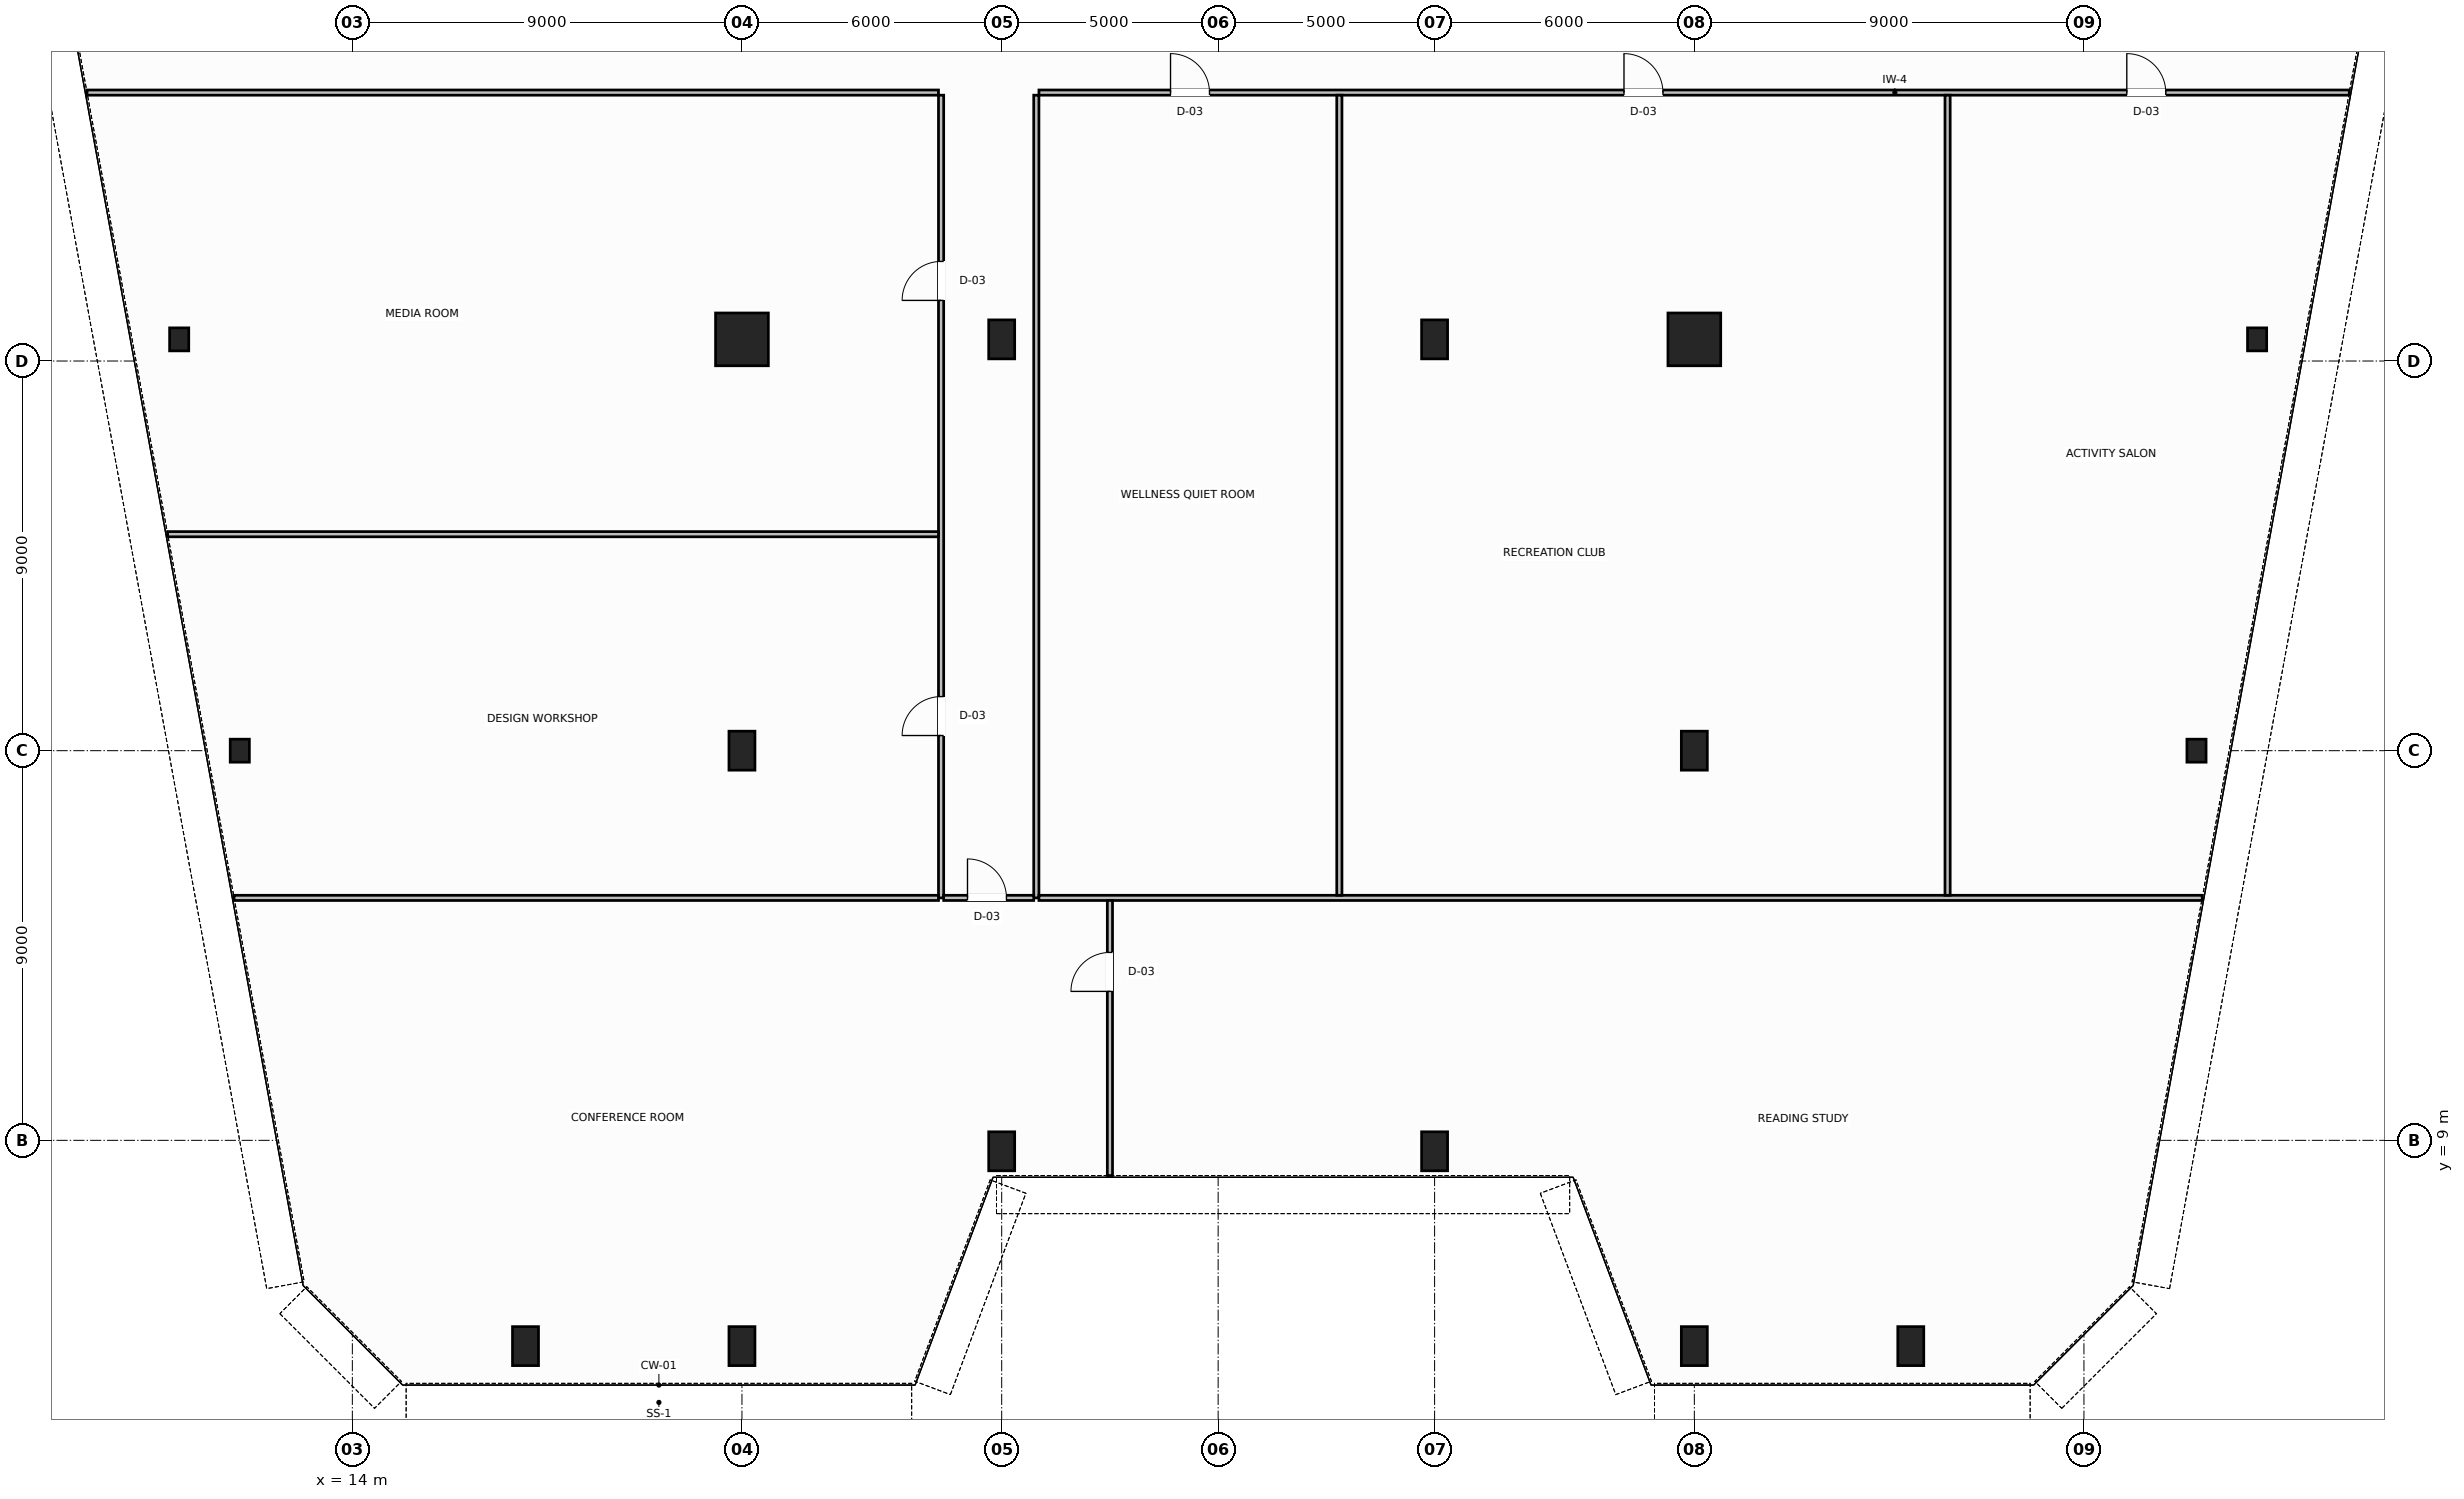
"""IFC4 building model, lengths in metres.
Left out: names, types, materials, properties, quantities, classifications, styles, units other than length and angle.
Written with IfcOpenShell. Run it as: python <this file> out.ifc"""

import sys

from ifc_helpers import new_model, si_unit, direction, frame, frame_2d, origin, origin_2d, place, context, subcontext, project, spatial, rectangle, hollow_rectangle, hollow_circle, i_section, extrude, source, transform, mapped, element, fill, save


model = new_model("IFC4")
c1 = context("Model", 3, precision=1e-05, world=origin(), true_north=direction((0.0, 1.0)))
c2 = subcontext(c1, "Body", "Model", "MODEL_VIEW")
j1 = project(units=[si_unit("LENGTHUNIT", "METRE"), si_unit("PLANEANGLEUNIT", "RADIAN")], contexts=[c1])
p1 = place(None, origin())
s1 = spatial("IfcSite", under=j1, at=p1, CompositionType="ELEMENT")
p2 = place(p1, origin())
s2 = spatial("IfcBuilding", under=s1, at=p2, CompositionType="ELEMENT")
p3 = place(p2, frame((0.0, 0.0, 72.0)))
s3 = spatial("IfcBuildingStorey", under=s2, at=p3, CompositionType="ELEMENT", Elevation=72.0)
m1 = source(origin(), c2, "Body", "SweptSolid", [
    extrude(i_section(OverallWidth=0.442, OverallDepth=0.531, WebThickness=0.065, FlangeThickness=0.076, FilletRadius=0.015, at=origin_2d()), origin(), (0.0, 0.0, 1.0), 3.8),
])
for number, where, z_axis, x_axis in (
    (1, (10.0, 27.5, 0.0), (0.0, 0.0, 1.0), (1.0, 0.0, 0.0)),
    (2, (11.4, 18.0, 0.0), (0.0, 0.0, 1.0), (1.0, 0.0, 0.0)),
    (3, (58.0, 27.5, 0.0), (0.0, 0.0, 1.0), (1.0, 0.0, 0.0)),
    (4, (56.6, 18.0, 0.0), (0.0, 0.0, 1.0), (1.0, 0.0, 0.0)),
):
    element("IfcColumn", number, at=place(p3, frame(where, z_axis=z_axis, x_axis=x_axis)), inside=s3, PredefinedType="COLUMN", context=c2, shape_type="MappedRepresentation", body=[
        mapped(m1, transform((0.0, 0.0, 0.0), scale=1.0)),
    ])
m2 = source(origin(), c2, "Body", "SweptSolid", [
    extrude(hollow_circle(Radius=0.61, WallThickness=0.05, at=origin_2d()), origin(), (0.0, 0.0, 1.0), 3.8),
])
p4 = place(p3, frame((23.0, 27.5, 0.0), z_axis=(0.0, 0.0, 1.0), x_axis=(1.0, 0.0, 0.0)))
e5 = element("IfcColumn", 5, at=p4, inside=s3, PredefinedType="COLUMN", context=c2, shape_type="MappedRepresentation", body=[
    mapped(m2, transform((0.0, 0.0, 0.0), scale=1.0)),
])
m3 = source(origin(), c2, "Body", "SweptSolid", [
    extrude(hollow_rectangle(XDim=0.6, YDim=0.9, WallThickness=0.04, InnerFilletRadius=0.04, OuterFilletRadius=0.08, at=origin_2d()), origin(), (0.0, 0.0, 1.0), 3.8),
])
for number, where, z_axis, x_axis in (
    (6, (29.0, 27.5, 0.0), (0.0, 0.0, 1.0), (1.0, 0.0, 0.0)),
    (7, (39.0, 27.5, 0.0), (0.0, 0.0, 1.0), (1.0, 0.0, 0.0)),
):
    element("IfcColumn", number, at=place(p3, frame(where, z_axis=z_axis, x_axis=x_axis)), inside=s3, PredefinedType="COLUMN", context=c2, shape_type="MappedRepresentation", body=[
        mapped(m3, transform((0.0, 0.0, 0.0), scale=1.0)),
    ])
p5 = place(p3, frame((45.0, 27.5, 0.0), z_axis=(0.0, 0.0, 1.0), x_axis=(1.0, 0.0, 0.0)))
e8 = element("IfcColumn", 8, at=p5, inside=s3, PredefinedType="COLUMN", context=c2, shape_type="MappedRepresentation", body=[
    mapped(m2, transform((0.0, 0.0, 0.0), scale=1.0)),
])
for number, where, z_axis, x_axis in (
    (9, (23.0, 18.0, 0.0), (0.0, 0.0, 1.0), (1.0, 0.0, 0.0)),
    (10, (45.0, 18.0, 0.0), (0.0, 0.0, 1.0), (1.0, 0.0, 0.0)),
):
    element("IfcColumn", number, at=place(p3, frame(where, z_axis=z_axis, x_axis=x_axis)), inside=s3, PredefinedType="COLUMN", context=c2, shape_type="MappedRepresentation", body=[
        mapped(m3, transform((0.0, 0.0, 0.0), scale=1.0)),
    ])
m4 = source(origin(), c2, "Body", "SweptSolid", [
    extrude(hollow_rectangle(XDim=0.6, YDim=0.9, WallThickness=0.04, InnerFilletRadius=0.04, OuterFilletRadius=0.08, at=origin_2d()), origin(), (0.0, 0.0, 1.0), 3.744),
])
for number, where, z_axis, x_axis in (
    (11, (18.0, 4.247, 0.032), (0.0, 0.064, 0.998), (-1.0, 0.0, 0.0)),
    (12, (23.0, 4.247, 0.032), (0.0, 0.064, 0.998), (-1.0, 0.0, 0.0)),
    (13, (29.0, 8.747, 0.032), (0.0, 0.064, 0.998), (-1.0, 0.0, 0.0)),
    (14, (39.0, 8.747, 0.032), (0.0, 0.064, 0.998), (-1.0, 0.0, 0.0)),
    (15, (45.0, 4.247, 0.032), (0.0, 0.064, 0.998), (-1.0, 0.0, 0.0)),
    (16, (50.0, 4.247, 0.032), (0.0, 0.064, 0.998), (-1.0, 0.0, 0.0)),
):
    element("IfcColumn", number, at=place(p3, frame(where, z_axis=z_axis, x_axis=x_axis)), inside=s3, PredefinedType="COLUMN", context=c2, shape_type="MappedRepresentation", body=[
        mapped(m4, transform((0.0, 0.0, 0.0), scale=1.0)),
    ])
p6 = place(p3, frame((7.871, 33.2, 0.0), z_axis=(0.0, 0.0, 1.0), x_axis=(1.0, 0.0, 0.0)))
e17 = element("IfcWall", 17, at=p6, inside=s3, PredefinedType="PARTITIONING", context=c2, shape_type="SweptSolid", body=[
    extrude(rectangle(XDim=19.669, YDim=0.12, at=frame_2d((9.835, 0.0))), origin(), (0.0, 0.0, 1.0), 3.07),
])
p7 = place(p3, frame((29.86, 33.2, 0.0), z_axis=(0.0, 0.0, 1.0), x_axis=(1.0, 0.0, 0.0)))
e18 = element("IfcWall", 18, at=p7, inside=s3, PredefinedType="PARTITIONING", context=c2, shape_type="SweptSolid", body=[
    extrude(rectangle(XDim=30.269, YDim=0.12, at=frame_2d((15.135, 0.0))), origin(), (0.0, 0.0, 1.0), 3.07),
])
p8 = place(p7, frame((3.04, 0.0, 0.0)))
e19 = element("IfcOpeningElement", 19, at=p8, cuts=e18, PredefinedType="OPENING", context=c2, shape_type="SweptSolid", body=[
    extrude(rectangle(XDim=0.9, YDim=2.15, at=frame_2d((0.45, 1.075))), frame((0.0, 0.07, 0.0), z_axis=(0.0, -1.0, 0.0), x_axis=(1.0, 0.0, 0.0)), (0.0, 0.0, 1.0), 0.14),
])
p9 = place(p7, frame((13.515, 0.0, 0.0)))
e20 = element("IfcOpeningElement", 20, at=p9, cuts=e18, PredefinedType="OPENING", context=c2, shape_type="SweptSolid", body=[
    extrude(rectangle(XDim=0.9, YDim=2.15, at=frame_2d((0.45, 1.075))), frame((0.0, 0.07, 0.0), z_axis=(0.0, -1.0, 0.0), x_axis=(1.0, 0.0, 0.0)), (0.0, 0.0, 1.0), 0.14),
])
p10 = place(p7, frame((25.13, 0.0, 0.0)))
e21 = element("IfcOpeningElement", 21, at=p10, cuts=e18, PredefinedType="OPENING", context=c2, shape_type="SweptSolid", body=[
    extrude(rectangle(XDim=0.9, YDim=2.15, at=frame_2d((0.45, 1.075))), frame((0.0, 0.07, 0.0), z_axis=(0.0, -1.0, 0.0), x_axis=(1.0, 0.0, 0.0)), (0.0, 0.0, 1.0), 0.14),
])
p11 = place(p3, frame((27.6, 14.6, 0.0), z_axis=(0.0, 0.0, 1.0), x_axis=(0.0, 1.0, 0.0)))
e22 = element("IfcWall", 22, at=p11, inside=s3, PredefinedType="PARTITIONING", context=c2, shape_type="SweptSolid", body=[
    extrude(rectangle(XDim=18.54, YDim=0.12, at=frame_2d((9.27, 0.0))), origin(), (0.0, 0.0, 1.0), 3.58),
])
p12 = place(p11, frame((3.75, 0.0, 0.0)))
e23 = element("IfcOpeningElement", 23, at=p12, cuts=e22, PredefinedType="OPENING", context=c2, shape_type="SweptSolid", body=[
    extrude(rectangle(XDim=0.9, YDim=2.15, at=frame_2d((0.45, 1.075))), frame((0.0, 0.07, 0.0), z_axis=(0.0, -1.0, 0.0), x_axis=(1.0, 0.0, 0.0)), (0.0, 0.0, 1.0), 0.14),
])
p13 = place(p11, frame((13.8, 0.0, 0.0)))
e24 = element("IfcOpeningElement", 24, at=p13, cuts=e22, PredefinedType="OPENING", context=c2, shape_type="SweptSolid", body=[
    extrude(rectangle(XDim=0.9, YDim=2.15, at=frame_2d((0.45, 1.075))), frame((0.0, 0.07, 0.0), z_axis=(0.0, -1.0, 0.0), x_axis=(1.0, 0.0, 0.0)), (0.0, 0.0, 1.0), 0.14),
])
p14 = place(p3, frame((29.8, 14.6, 0.0), z_axis=(0.0, 0.0, 1.0), x_axis=(0.0, 1.0, 0.0)))
e25 = element("IfcWall", 25, at=p14, inside=s3, PredefinedType="PARTITIONING", context=c2, shape_type="SweptSolid", body=[
    extrude(rectangle(XDim=18.54, YDim=0.12, at=frame_2d((9.27, 0.0))), origin(), (0.0, 0.0, 1.0), 3.58),
])
p15 = place(p3, frame((27.66, 14.6, 0.0), z_axis=(0.0, 0.0, 1.0), x_axis=(1.0, 0.0, 0.0)))
e26 = element("IfcWall", 26, at=p15, inside=s3, PredefinedType="PARTITIONING", context=c2, shape_type="SweptSolid", body=[
    extrude(rectangle(XDim=2.08, YDim=0.12, at=frame_2d((1.04, 0.0))), origin(), (0.0, 0.0, 1.0), 3.58),
])
p16 = place(p15, frame((0.55, 0.0, 0.0)))
e27 = element("IfcOpeningElement", 27, at=p16, cuts=e26, PredefinedType="OPENING", context=c2, shape_type="SweptSolid", body=[
    extrude(rectangle(XDim=0.9, YDim=2.15, at=frame_2d((0.45, 1.075))), frame((0.0, 0.07, 0.0), z_axis=(0.0, -1.0, 0.0), x_axis=(1.0, 0.0, 0.0)), (0.0, 0.0, 1.0), 0.14),
])
p17 = place(p3, frame((11.268, 14.6, 0.0), z_axis=(0.0, 0.0, 1.0), x_axis=(1.0, 0.0, 0.0)))
e28 = element("IfcWall", 28, at=p17, inside=s3, PredefinedType="PARTITIONING", context=c2, shape_type="SweptSolid", body=[
    extrude(rectangle(XDim=16.272, YDim=0.12, at=frame_2d((8.136, 0.0))), origin(), (0.0, 0.0, 1.0), 3.58),
])
p18 = place(p3, frame((29.86, 14.6, 0.0), z_axis=(0.0, 0.0, 1.0), x_axis=(1.0, 0.0, 0.0)))
e29 = element("IfcWall", 29, at=p18, inside=s3, PredefinedType="PARTITIONING", context=c2, shape_type="SweptSolid", body=[
    extrude(rectangle(XDim=26.872, YDim=0.12, at=frame_2d((13.436, 0.0))), origin(), (0.0, 0.0, 1.0), 3.58),
])
p19 = place(p3, frame((31.5, 8.187, 0.0), z_axis=(0.0, 0.0, 1.0), x_axis=(0.0, 1.0, 0.0)))
e30 = element("IfcWall", 30, at=p19, inside=s3, PredefinedType="PARTITIONING", context=c2, shape_type="SweptSolid", body=[
    extrude(rectangle(XDim=6.353, YDim=0.12, at=frame_2d((3.177, 0.0))), origin(), (0.0, 0.0, 1.0), 3.58),
])
p20 = place(p19, frame((4.253, 0.0, 0.0)))
e31 = element("IfcOpeningElement", 31, at=p20, cuts=e30, PredefinedType="OPENING", context=c2, shape_type="SweptSolid", body=[
    extrude(rectangle(XDim=0.9, YDim=2.15, at=frame_2d((0.45, 1.075))), frame((0.0, 0.07, 0.0), z_axis=(0.0, -1.0, 0.0), x_axis=(1.0, 0.0, 0.0)), (0.0, 0.0, 1.0), 0.14),
])
p21 = place(p3, frame((9.734, 23.0, 0.0), z_axis=(0.0, 0.0, 1.0), x_axis=(1.0, 0.0, 0.0)))
e32 = element("IfcWall", 32, at=p21, inside=s3, PredefinedType="PARTITIONING", context=c2, shape_type="SweptSolid", body=[
    extrude(rectangle(XDim=17.806, YDim=0.12, at=frame_2d((8.903, 0.0))), origin(), (0.0, 0.0, 1.0), 3.58),
])
for number, where, z_axis, x_axis in (
    (33, (36.8, 14.66, 0.0), (0.0, 0.0, 1.0), (0.0, 1.0, 0.0)),
    (34, (50.85, 14.66, 0.0), (0.0, 0.0, 1.0), (0.0, 1.0, 0.0)),
):
    element("IfcWall", number, at=place(p3, frame(where, z_axis=z_axis, x_axis=x_axis)), inside=s3, PredefinedType="PARTITIONING", context=c2, shape_type="SweptSolid", body=[
        extrude(rectangle(XDim=18.48, YDim=0.12, at=frame_2d((9.24, 0.0))), origin(), (0.0, 0.0, 1.0), 3.58),
    ])
m5 = source(origin(), c2, "Body", "SweptSolid", [
    extrude(rectangle(XDim=0.9, YDim=2.15, at=frame_2d((0.45, 1.075))), frame((0.0, 0.025, 0.0), z_axis=(0.0, -1.0, 0.0), x_axis=(1.0, 0.0, 0.0)), (0.0, 0.0, 1.0), 0.05),
])
p22 = place(p16, origin())
e35 = element("IfcDoor", 35, at=p22, inside=s3, OperationType="SINGLE_SWING_LEFT", PredefinedType="DOOR", context=c2, shape_type="MappedRepresentation", body=[
    mapped(m5, transform((0.0, 0.0, 0.0), scale=1.0)),
])
fill(e27, e35)
p23 = place(p20, origin())
e36 = element("IfcDoor", 36, at=p23, inside=s3, OperationType="SINGLE_SWING_RIGHT", PredefinedType="DOOR", context=c2, shape_type="MappedRepresentation", body=[
    mapped(m5, transform((0.0, 0.0, 0.0), scale=1.0)),
])
fill(e31, e36)
p24 = place(p12, origin())
e37 = element("IfcDoor", 37, at=p24, inside=s3, OperationType="SINGLE_SWING_LEFT", PredefinedType="DOOR", context=c2, shape_type="MappedRepresentation", body=[
    mapped(m5, transform((0.0, 0.0, 0.0), scale=1.0)),
])
fill(e23, e37)
p25 = place(p13, origin())
e38 = element("IfcDoor", 38, at=p25, inside=s3, OperationType="SINGLE_SWING_RIGHT", PredefinedType="DOOR", context=c2, shape_type="MappedRepresentation", body=[
    mapped(m5, transform((0.0, 0.0, 0.0), scale=1.0)),
])
fill(e24, e38)
p26 = place(p8, origin())
e39 = element("IfcDoor", 39, at=p26, inside=s3, OperationType="SINGLE_SWING_RIGHT", PredefinedType="DOOR", context=c2, shape_type="MappedRepresentation", body=[
    mapped(m5, transform((0.0, 0.0, 0.0), scale=1.0)),
])
fill(e19, e39)
p27 = place(p9, origin())
e40 = element("IfcDoor", 40, at=p27, inside=s3, OperationType="SINGLE_SWING_LEFT", PredefinedType="DOOR", context=c2, shape_type="MappedRepresentation", body=[
    mapped(m5, transform((0.0, 0.0, 0.0), scale=1.0)),
])
fill(e20, e40)
p28 = place(p10, origin())
e41 = element("IfcDoor", 41, at=p28, inside=s3, OperationType="SINGLE_SWING_RIGHT", PredefinedType="DOOR", context=c2, shape_type="MappedRepresentation", body=[
    mapped(m5, transform((0.0, 0.0, 0.0), scale=1.0)),
])
fill(e21, e41)
save(model, sys.argv[1])
